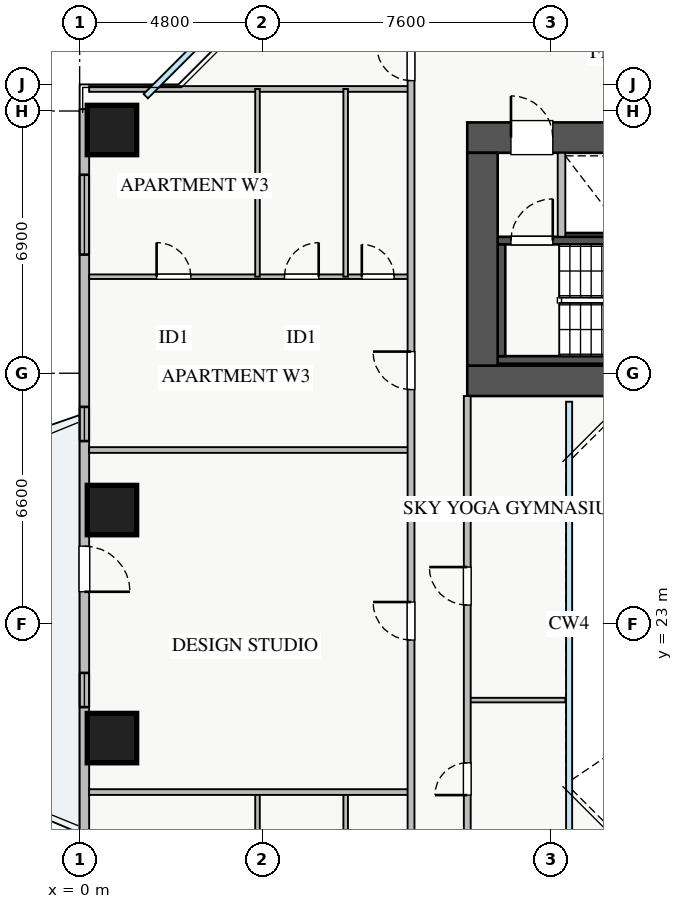
"""IFC4 building model, lengths in metres.
Left out: names, types, materials, properties, quantities, classifications, styles, units other than length and angle.
Written with IfcOpenShell. Run it as: python <this file> out.ifc"""

import sys

from ifc_helpers import new_model, si_unit, direction, frame, frame_2d, origin, origin_2d, place, context, subcontext, project, spatial, rectangle, extrude, source, transform, mapped, element, fill, save


model = new_model("IFC4")
c1 = context("Model", 3, precision=1e-05, world=origin(), true_north=direction((0.0, 1.0)))
c2 = subcontext(c1, "Body", "Model", "MODEL_VIEW")
j1 = project(units=[si_unit("LENGTHUNIT", "METRE"), si_unit("PLANEANGLEUNIT", "RADIAN")], contexts=[c1])
p1 = place(None, origin())
s1 = spatial("IfcSite", under=j1, at=p1, CompositionType="ELEMENT")
p2 = place(p1, origin())
s2 = spatial("IfcBuilding", under=s1, at=p2, CompositionType="ELEMENT")
p3 = place(p2, frame((0.0, 0.0, 86.0)))
s3 = spatial("IfcBuildingStorey", under=s2, at=p3, CompositionType="ELEMENT", Elevation=86.0)
p4 = place(p3, frame((12.68, 33.2, 0.0), z_axis=(0.0, 0.0, 1.0), x_axis=(1.0, 0.0, 0.0)))
e1 = element("IfcWall", 1, at=p4, inside=s3, PredefinedType="SHEAR", context=c2, shape_type="SweptSolid", body=[
    extrude(rectangle(XDim=1.94, YDim=0.18, at=frame_2d((0.97, 0.0))), origin(), (0.0, 0.0, 1.0), 3.07),
])
p5 = place(p3, frame((11.0, 29.95, 0.0), z_axis=(0.0, 0.0, 1.0), x_axis=(1.0, 0.0, 0.0)))
e2 = element("IfcWall", 2, at=p5, inside=s3, PredefinedType="SHEAR", context=c2, shape_type="SweptSolid", body=[
    extrude(rectangle(XDim=7.15, YDim=0.2, at=frame_2d((3.575, 0.0))), origin(), (0.0, 0.0, 1.0), 3.25),
])
p6 = place(p3, frame((11.0, 33.09, 0.0), z_axis=(0.0, 0.0, 1.0), x_axis=(1.0, 0.0, 0.0)))
e3 = element("IfcWall", 3, at=p6, inside=s3, PredefinedType="SHEAR", context=c2, shape_type="SweptSolid", body=[
    extrude(rectangle(XDim=7.15, YDim=0.2, at=frame_2d((3.575, 0.0))), origin(), (0.0, 0.0, 1.0), 3.25),
])
p7 = place(p6, frame((0.35, 0.0, 0.0)))
e4 = element("IfcOpeningElement", 4, at=p7, cuts=e3, PredefinedType="OPENING", context=c2, shape_type="SweptSolid", body=[
    extrude(rectangle(XDim=1.1, YDim=2.05, at=frame_2d((0.55, 1.025))), frame((0.0, 0.11, 0.0), z_axis=(0.0, -1.0, 0.0), x_axis=(1.0, 0.0, 0.0)), (0.0, 0.0, 1.0), 0.22),
])
p8 = place(p3, frame((11.1, 30.05, 0.0), z_axis=(0.0, 0.0, 1.0), x_axis=(0.0, 1.0, 0.0)))
e5 = element("IfcWall", 5, at=p8, inside=s3, PredefinedType="SHEAR", context=c2, shape_type="SweptSolid", body=[
    extrude(rectangle(XDim=2.94, YDim=0.2, at=frame_2d((1.47, 0.0))), origin(), (0.0, 0.0, 1.0), 3.25),
])
p9 = place(p3, frame((10.2, 29.4, 0.0), z_axis=(0.0, 0.0, 1.0), x_axis=(1.0, 0.0, 0.0)))
e6 = element("IfcWall", 6, at=p9, inside=s3, PredefinedType="SHEAR", context=c2, shape_type="SweptSolid", body=[
    extrude(rectangle(XDim=17.6, YDim=0.8, at=frame_2d((8.8, 0.0))), origin(), (0.0, 0.0, 1.0), 3.25),
])
p10 = place(p3, frame((10.2, 35.8, 0.0), z_axis=(0.0, 0.0, 1.0), x_axis=(1.0, 0.0, 0.0)))
e7 = element("IfcWall", 7, at=p10, inside=s3, PredefinedType="SHEAR", context=c2, shape_type="SweptSolid", body=[
    extrude(rectangle(XDim=17.6, YDim=0.8, at=frame_2d((8.8, 0.0))), origin(), (0.0, 0.0, 1.0), 3.25),
])
p11 = place(p10, frame((1.15, 0.0, 0.0)))
e8 = element("IfcOpeningElement", 8, at=p11, cuts=e7, PredefinedType="OPENING", context=c2, shape_type="SweptSolid", body=[
    extrude(rectangle(XDim=1.1, YDim=2.05, at=frame_2d((0.55, 1.025))), frame((0.0, 0.41, 0.0), z_axis=(0.0, -1.0, 0.0), x_axis=(1.0, 0.0, 0.0)), (0.0, 0.0, 1.0), 0.82),
])
p12 = place(p10, frame((8.3, 0.0, 0.0)))
e9 = element("IfcOpeningElement", 9, at=p12, cuts=e7, PredefinedType="OPENING", context=c2, shape_type="SweptSolid", body=[
    extrude(rectangle(XDim=1.1, YDim=2.05, at=frame_2d((0.55, 1.025))), frame((0.0, 0.41, 0.0), z_axis=(0.0, -1.0, 0.0), x_axis=(1.0, 0.0, 0.0)), (0.0, 0.0, 1.0), 0.82),
])
p13 = place(p10, frame((10.05, 0.0, 0.0)))
e10 = element("IfcOpeningElement", 10, at=p13, cuts=e7, PredefinedType="OPENING", context=c2, shape_type="SweptSolid", body=[
    extrude(rectangle(XDim=1.1, YDim=2.05, at=frame_2d((0.55, 1.025))), frame((0.0, 0.41, 0.0), z_axis=(0.0, -1.0, 0.0), x_axis=(1.0, 0.0, 0.0)), (0.0, 0.0, 1.0), 0.82),
])
p14 = place(p10, frame((14.74, 0.0, 0.0)))
e11 = element("IfcOpeningElement", 11, at=p14, cuts=e7, PredefinedType="OPENING", context=c2, shape_type="SweptSolid", body=[
    extrude(rectangle(XDim=1.0, YDim=2.05, at=frame_2d((0.5, 1.025))), frame((0.0, 0.41, 0.0), z_axis=(0.0, -1.0, 0.0), x_axis=(1.0, 0.0, 0.0)), (0.0, 0.0, 1.0), 0.82),
])
p15 = place(p10, frame((12.585, 0.0, 0.0)))
e12 = element("IfcOpeningElement", 12, at=p15, cuts=e7, PredefinedType="OPENING", context=c2, shape_type="SweptSolid", body=[
    extrude(rectangle(XDim=1.0, YDim=2.05, at=frame_2d((0.5, 1.025))), frame((0.0, 0.41, 0.0), z_axis=(0.0, -1.0, 0.0), x_axis=(1.0, 0.0, 0.0)), (0.0, 0.0, 1.0), 0.82),
])
p16 = place(p3, frame((10.6, 29.8, 0.0), z_axis=(0.0, 0.0, 1.0), x_axis=(0.0, 1.0, 0.0)))
e13 = element("IfcWall", 13, at=p16, inside=s3, PredefinedType="SHEAR", context=c2, shape_type="SweptSolid", body=[
    extrude(rectangle(XDim=5.6, YDim=0.8, at=frame_2d((2.8, 0.0))), origin(), (0.0, 0.0, 1.0), 3.25),
])
m1 = source(origin(), c2, "Body", "SweptSolid", [
    extrude(rectangle(XDim=1.3, YDim=1.3, at=origin_2d()), origin(), (0.0, 0.0, 1.0), 3.25),
])
for number, where, z_axis, x_axis in (
    (14, (0.85, 36.0, 0.0), (0.0, 0.0, 1.0), (1.0, 0.0, 0.0)),
    (15, (0.85, 26.0, 0.0), (0.0, 0.0, 1.0), (1.0, 0.0, 0.0)),
    (16, (0.85, 20.0, 0.0), (0.0, 0.0, 1.0), (1.0, 0.0, 0.0)),
):
    element("IfcColumn", number, at=place(p3, frame(where, z_axis=z_axis, x_axis=x_axis)), inside=s3, PredefinedType="COLUMN", context=c2, shape_type="MappedRepresentation", body=[
        mapped(m1, transform((0.0, 0.0, 0.0), x_axis=(1.0, 0.0, 0.0), y_axis=(0.0, 1.0, 0.0), z_axis=(0.0, 0.0, 1.0), scale=1.0)),
    ])
p17 = place(p3, frame((0.125, 9.45, 0.0), z_axis=(0.0, 0.0, 1.0), x_axis=(0.0, 1.0, 0.0)))
e17 = element("IfcWall", 17, at=p17, inside=s3, PredefinedType="STANDARD", context=c2, shape_type="SweptSolid", body=[
    extrude(rectangle(XDim=27.1, YDim=0.25, at=frame_2d((13.55, 0.0))), origin(), (0.0, 0.0, 1.0), 2.61),
])
p18 = place(p17, frame((14.4, 0.0, 0.0)))
e18 = element("IfcOpeningElement", 18, at=p18, cuts=e17, PredefinedType="OPENING", context=c2, shape_type="SweptSolid", body=[
    extrude(rectangle(XDim=1.2, YDim=2.1, at=frame_2d((0.6, 1.05))), frame((0.0, 0.135, 0.0), z_axis=(0.0, -1.0, 0.0), x_axis=(1.0, 0.0, 0.0)), (0.0, 0.0, 1.0), 0.27),
])
p19 = place(p17, frame((1.482, 0.0, 0.9)))
e19 = element("IfcOpeningElement", 19, at=p19, cuts=e17, PredefinedType="OPENING", context=c2, shape_type="SweptSolid", body=[
    extrude(rectangle(XDim=2.1, YDim=1.5, at=frame_2d((1.05, 0.75))), frame((0.0, 0.135, 0.0), z_axis=(0.0, -1.0, 0.0), x_axis=(1.0, 0.0, 0.0)), (0.0, 0.0, 1.0), 0.27),
])
p20 = place(p17, frame((23.272, 0.0, 0.9)))
e20 = element("IfcOpeningElement", 20, at=p20, cuts=e17, PredefinedType="OPENING", context=c2, shape_type="SweptSolid", body=[
    extrude(rectangle(XDim=2.1, YDim=1.5, at=frame_2d((1.05, 0.75))), frame((0.0, 0.135, 0.0), z_axis=(0.0, -1.0, 0.0), x_axis=(1.0, 0.0, 0.0)), (0.0, 0.0, 1.0), 0.27),
])
p21 = place(p17, frame((5.317, 0.0, 0.9)))
e21 = element("IfcOpeningElement", 21, at=p21, cuts=e17, PredefinedType="OPENING", context=c2, shape_type="SweptSolid", body=[
    extrude(rectangle(XDim=2.4, YDim=1.5, at=frame_2d((1.2, 0.75))), frame((0.0, 0.135, 0.0), z_axis=(0.0, -1.0, 0.0), x_axis=(1.0, 0.0, 0.0)), (0.0, 0.0, 1.0), 0.27),
])
p22 = place(p17, frame((11.365, 0.0, 0.9)))
e22 = element("IfcOpeningElement", 22, at=p22, cuts=e17, PredefinedType="OPENING", context=c2, shape_type="SweptSolid", body=[
    extrude(rectangle(XDim=0.9, YDim=1.2, at=frame_2d((0.45, 0.6))), frame((0.0, 0.135, 0.0), z_axis=(0.0, -1.0, 0.0), x_axis=(1.0, 0.0, 0.0)), (0.0, 0.0, 1.0), 0.27),
])
p23 = place(p17, frame((18.365, 0.0, 0.9)))
e23 = element("IfcOpeningElement", 23, at=p23, cuts=e17, PredefinedType="OPENING", context=c2, shape_type="SweptSolid", body=[
    extrude(rectangle(XDim=0.9, YDim=1.2, at=frame_2d((0.45, 0.6))), frame((0.0, 0.135, 0.0), z_axis=(0.0, -1.0, 0.0), x_axis=(1.0, 0.0, 0.0)), (0.0, 0.0, 1.0), 0.27),
])
p24 = place(p3, frame((12.68, 33.19, 0.0), z_axis=(0.0, 0.0, 1.0), x_axis=(0.0, 1.0, 0.0)))
e24 = element("IfcWall", 24, at=p24, inside=s3, PredefinedType="PARTITIONING", context=c2, shape_type="SweptSolid", body=[
    extrude(rectangle(XDim=2.21, YDim=0.2, at=frame_2d((1.105, 0.0))), origin(), (0.0, 0.0, 1.0), 3.07),
])
p25 = place(p3, frame((0.25, 37.08, 0.0), z_axis=(0.0, 0.0, 1.0), x_axis=(1.0, 0.0, 0.0)))
e25 = element("IfcWall", 25, at=p25, inside=s3, PredefinedType="PARTITIONING", context=c2, shape_type="SweptSolid", body=[
    extrude(rectangle(XDim=8.47, YDim=0.15, at=frame_2d((4.235, 0.0))), origin(), (0.0, 0.0, 1.0), 3.07),
])
for number, where, z_axis, x_axis in (
    (26, (4.68, 13.37, 0.0), (0.0, 0.0, 1.0), (0.0, 1.0, 0.0)),
    (27, (7.0, 13.37, 0.0), (0.0, 0.0, 1.0), (0.0, 1.0, 0.0)),
):
    element("IfcWall", number, at=place(p3, frame(where, z_axis=z_axis, x_axis=x_axis)), inside=s3, PredefinedType="PLUMBINGWALL", context=c2, shape_type="SweptSolid", body=[
        extrude(rectangle(XDim=5.21, YDim=0.12, at=frame_2d((2.605, 0.0))), origin(), (0.0, 0.0, 1.0), 3.07),
    ])
p26 = place(p3, frame((0.25, 18.58, 0.0), z_axis=(0.0, 0.0, 1.0), x_axis=(1.0, 0.0, 0.0)))
e28 = element("IfcWall", 28, at=p26, inside=s3, PredefinedType="PARTITIONING", context=c2, shape_type="SweptSolid", body=[
    extrude(rectangle(XDim=8.47, YDim=0.15, at=frame_2d((4.235, 0.0))), origin(), (0.0, 0.0, 1.0), 3.07),
])
p27 = place(p3, frame((0.25, 32.14, 0.0), z_axis=(0.0, 0.0, 1.0), x_axis=(1.0, 0.0, 0.0)))
e29 = element("IfcWall", 29, at=p27, inside=s3, PredefinedType="PLUMBINGWALL", context=c2, shape_type="SweptSolid", body=[
    extrude(rectangle(XDim=8.47, YDim=0.12, at=frame_2d((4.235, 0.0))), origin(), (0.0, 0.0, 1.0), 3.07),
])
p28 = place(p27, frame((1.775, 0.0, 0.0)))
e30 = element("IfcOpeningElement", 30, at=p28, cuts=e29, PredefinedType="OPENING", context=c2, shape_type="SweptSolid", body=[
    extrude(rectangle(XDim=0.9, YDim=2.05, at=frame_2d((0.45, 1.025))), frame((0.0, 0.07, 0.0), z_axis=(0.0, -1.0, 0.0), x_axis=(1.0, 0.0, 0.0)), (0.0, 0.0, 1.0), 0.14),
])
p29 = place(p27, frame((5.14, 0.0, 0.0)))
e31 = element("IfcOpeningElement", 31, at=p29, cuts=e29, PredefinedType="OPENING", context=c2, shape_type="SweptSolid", body=[
    extrude(rectangle(XDim=0.9, YDim=2.05, at=frame_2d((0.45, 1.025))), frame((0.0, 0.07, 0.0), z_axis=(0.0, -1.0, 0.0), x_axis=(1.0, 0.0, 0.0)), (0.0, 0.0, 1.0), 0.14),
])
p30 = place(p27, frame((7.175, 0.0, 0.0)))
e32 = element("IfcOpeningElement", 32, at=p30, cuts=e29, PredefinedType="OPENING", context=c2, shape_type="SweptSolid", body=[
    extrude(rectangle(XDim=0.85, YDim=2.05, at=frame_2d((0.425, 1.025))), frame((0.0, 0.07, 0.0), z_axis=(0.0, -1.0, 0.0), x_axis=(1.0, 0.0, 0.0)), (0.0, 0.0, 1.0), 0.14),
])
for number, where, z_axis, x_axis in (
    (33, (4.68, 32.14, 0.0), (0.0, 0.0, 1.0), (0.0, 1.0, 0.0)),
    (34, (7.0, 32.14, 0.0), (0.0, 0.0, 1.0), (0.0, 1.0, 0.0)),
):
    element("IfcWall", number, at=place(p3, frame(where, z_axis=z_axis, x_axis=x_axis)), inside=s3, PredefinedType="PLUMBINGWALL", context=c2, shape_type="SweptSolid", body=[
        extrude(rectangle(XDim=4.94, YDim=0.12, at=frame_2d((2.47, 0.0))), origin(), (0.0, 0.0, 1.0), 3.07),
    ])
p31 = place(p3, frame((0.25, 27.58, 0.0), z_axis=(0.0, 0.0, 1.0), x_axis=(1.0, 0.0, 0.0)))
e35 = element("IfcWall", 35, at=p31, inside=s3, PredefinedType="PARTITIONING", context=c2, shape_type="SweptSolid", body=[
    extrude(rectangle(XDim=8.47, YDim=0.15, at=frame_2d((4.235, 0.0))), origin(), (0.0, 0.0, 1.0), 3.07),
])
p32 = place(p3, frame((8.72, 7.21, 0.0), z_axis=(0.0, 0.0, 1.0), x_axis=(0.0, 1.0, 0.0)))
e36 = element("IfcWall", 36, at=p32, inside=s3, PredefinedType="PARTITIONING", context=c2, shape_type="SweptSolid", body=[
    extrude(rectangle(XDim=31.23, YDim=0.18, at=frame_2d((15.615, 0.0))), origin(), (0.0, 0.0, 1.0), 3.07),
])
p33 = place(p32, frame((30.09, 0.0, 0.0)))
e37 = element("IfcOpeningElement", 37, at=p33, cuts=e36, PredefinedType="OPENING", context=c2, shape_type="SweptSolid", body=[
    extrude(rectangle(XDim=0.9, YDim=2.05, at=frame_2d((0.45, 1.025))), frame((0.0, 0.1, 0.0), z_axis=(0.0, -1.0, 0.0), x_axis=(1.0, 0.0, 0.0)), (0.0, 0.0, 1.0), 0.2),
])
p34 = place(p32, frame((0.24, 0.0, 0.0)))
e38 = element("IfcOpeningElement", 38, at=p34, cuts=e36, PredefinedType="OPENING", context=c2, shape_type="SweptSolid", body=[
    extrude(rectangle(XDim=0.9, YDim=2.05, at=frame_2d((0.45, 1.025))), frame((0.0, 0.1, 0.0), z_axis=(0.0, -1.0, 0.0), x_axis=(1.0, 0.0, 0.0)), (0.0, 0.0, 1.0), 0.2),
])
p35 = place(p32, frame((3.07, 0.0, 0.0)))
e39 = element("IfcOpeningElement", 39, at=p35, cuts=e36, PredefinedType="OPENING", context=c2, shape_type="SweptSolid", body=[
    extrude(rectangle(XDim=1.0, YDim=2.05, at=frame_2d((0.5, 1.025))), frame((0.0, 0.1, 0.0), z_axis=(0.0, -1.0, 0.0), x_axis=(1.0, 0.0, 0.0)), (0.0, 0.0, 1.0), 0.2),
])
p36 = place(p32, frame((15.37, 0.0, 0.0)))
e40 = element("IfcOpeningElement", 40, at=p36, cuts=e36, PredefinedType="OPENING", context=c2, shape_type="SweptSolid", body=[
    extrude(rectangle(XDim=1.0, YDim=2.05, at=frame_2d((0.5, 1.025))), frame((0.0, 0.1, 0.0), z_axis=(0.0, -1.0, 0.0), x_axis=(1.0, 0.0, 0.0)), (0.0, 0.0, 1.0), 0.2),
])
p37 = place(p32, frame((21.96, 0.0, 0.0)))
e41 = element("IfcOpeningElement", 41, at=p37, cuts=e36, PredefinedType="OPENING", context=c2, shape_type="SweptSolid", body=[
    extrude(rectangle(XDim=1.0, YDim=2.05, at=frame_2d((0.5, 1.025))), frame((0.0, 0.1, 0.0), z_axis=(0.0, -1.0, 0.0), x_axis=(1.0, 0.0, 0.0)), (0.0, 0.0, 1.0), 0.2),
])
p38 = place(p3, frame((10.2, 21.0, 0.0), z_axis=(0.0, 0.0, 1.0), x_axis=(1.0, 0.0, 0.0)))
e42 = element("IfcWall", 42, at=p38, inside=s3, PredefinedType="PLUMBINGWALL", context=c2, shape_type="SweptSolid", body=[
    extrude(rectangle(XDim=2.58, YDim=0.12, at=frame_2d((1.29, 0.0))), origin(), (0.0, 0.0, 1.0), 3.07),
])
p39 = place(p3, frame((10.2, 17.0, 0.0), z_axis=(0.0, 0.0, 1.0), x_axis=(0.0, 1.0, 0.0)))
e43 = element("IfcWall", 43, at=p39, inside=s3, PredefinedType="PARTITIONING", context=c2, shape_type="SweptSolid", body=[
    extrude(rectangle(XDim=12.0, YDim=0.18, at=frame_2d((6.0, 0.0))), origin(), (0.0, 0.0, 1.0), 3.07),
])
p40 = place(p39, frame((1.5, 0.0, 0.0)))
e44 = element("IfcOpeningElement", 44, at=p40, cuts=e43, PredefinedType="OPENING", context=c2, shape_type="SweptSolid", body=[
    extrude(rectangle(XDim=0.85, YDim=2.05, at=frame_2d((0.425, 1.025))), frame((0.0, 0.1, 0.0), z_axis=(0.0, -1.0, 0.0), x_axis=(1.0, 0.0, 0.0)), (0.0, 0.0, 1.0), 0.2),
])
p41 = place(p39, frame((6.5, 0.0, 0.0)))
e45 = element("IfcOpeningElement", 45, at=p41, cuts=e43, PredefinedType="OPENING", context=c2, shape_type="SweptSolid", body=[
    extrude(rectangle(XDim=1.0, YDim=2.05, at=frame_2d((0.5, 1.025))), frame((0.0, 0.1, 0.0), z_axis=(0.0, -1.0, 0.0), x_axis=(1.0, 0.0, 0.0)), (0.0, 0.0, 1.0), 0.2),
])
m2 = source(origin(), c2, "Body", "SweptSolid", [
    extrude(rectangle(XDim=1.2, YDim=2.1, at=frame_2d((0.6, 1.05))), frame((0.0, 0.025, 0.0), z_axis=(0.0, -1.0, 0.0), x_axis=(1.0, 0.0, 0.0)), (0.0, 0.0, 1.0), 0.05),
])
p42 = place(p18, frame((1.2, 0.0, 0.0), z_axis=(0.0, 0.0, 1.0), x_axis=(-1.0, 0.0, 0.0)))
e46 = element("IfcDoor", 46, at=p42, inside=s3, OperationType="SINGLE_SWING_LEFT", PredefinedType="DOOR", context=c2, shape_type="MappedRepresentation", body=[
    mapped(m2, transform((0.0, 0.0, 0.0), x_axis=(1.0, 0.0, 0.0), y_axis=(0.0, 1.0, 0.0), z_axis=(0.0, 0.0, 1.0), scale=1.0)),
])
fill(e18, e46)
m3 = source(origin(), c2, "Body", "SweptSolid", [
    extrude(rectangle(XDim=2.1, YDim=1.5, at=frame_2d((1.05, 0.75))), frame((0.0, 0.03, 0.0), z_axis=(0.0, -1.0, 0.0), x_axis=(1.0, 0.0, 0.0)), (0.0, 0.0, 1.0), 0.06),
])
p43 = place(p20, origin())
e47 = element("IfcWindow", 47, at=p43, inside=s3, PartitioningType="TRIPLE_PANEL_VERTICAL", PredefinedType="WINDOW", context=c2, shape_type="MappedRepresentation", body=[
    mapped(m3, transform((0.0, 0.0, 0.0), x_axis=(1.0, 0.0, 0.0), y_axis=(0.0, 1.0, 0.0), z_axis=(0.0, 0.0, 1.0), scale=1.0)),
])
fill(e20, e47)
m4 = source(origin(), c2, "Body", "SweptSolid", [
    extrude(rectangle(XDim=1.1, YDim=2.05, at=frame_2d((0.55, 1.025))), frame((0.0, 0.025, 0.0), z_axis=(0.0, -1.0, 0.0), x_axis=(1.0, 0.0, 0.0)), (0.0, 0.0, 1.0), 0.05),
])
p44 = place(p11, origin())
e48 = element("IfcDoor", 48, at=p44, inside=s3, OperationType="SINGLE_SWING_LEFT", PredefinedType="DOOR", context=c2, shape_type="MappedRepresentation", body=[
    mapped(m4, transform((0.0, 0.0, 0.0), x_axis=(1.0, 0.0, 0.0), y_axis=(0.0, 1.0, 0.0), z_axis=(0.0, 0.0, 1.0), scale=1.0)),
])
fill(e8, e48)
p45 = place(p7, origin())
e49 = element("IfcDoor", 49, at=p45, inside=s3, OperationType="SINGLE_SWING_RIGHT", PredefinedType="DOOR", context=c2, shape_type="MappedRepresentation", body=[
    mapped(m4, transform((0.0, 0.0, 0.0), x_axis=(1.0, 0.0, 0.0), y_axis=(0.0, 1.0, 0.0), z_axis=(0.0, 0.0, 1.0), scale=1.0)),
])
fill(e4, e49)
m5 = source(origin(), c2, "Body", "SweptSolid", [
    extrude(rectangle(XDim=0.9, YDim=2.05, at=frame_2d((0.45, 1.025))), frame((0.0, 0.025, 0.0), z_axis=(0.0, -1.0, 0.0), x_axis=(1.0, 0.0, 0.0)), (0.0, 0.0, 1.0), 0.05),
])
p46 = place(p28, origin())
e50 = element("IfcDoor", 50, at=p46, inside=s3, OperationType="SINGLE_SWING_LEFT", PredefinedType="DOOR", context=c2, shape_type="MappedRepresentation", body=[
    mapped(m5, transform((0.0, 0.0, 0.0), x_axis=(1.0, 0.0, 0.0), y_axis=(0.0, 1.0, 0.0), z_axis=(0.0, 0.0, 1.0), scale=1.0)),
])
fill(e30, e50)
p47 = place(p29, origin())
e51 = element("IfcDoor", 51, at=p47, inside=s3, OperationType="SINGLE_SWING_RIGHT", PredefinedType="DOOR", context=c2, shape_type="MappedRepresentation", body=[
    mapped(m5, transform((0.0, 0.0, 0.0), x_axis=(1.0, 0.0, 0.0), y_axis=(0.0, 1.0, 0.0), z_axis=(0.0, 0.0, 1.0), scale=1.0)),
])
fill(e31, e51)
m6 = source(origin(), c2, "Body", "SweptSolid", [
    extrude(rectangle(XDim=0.85, YDim=2.05, at=frame_2d((0.425, 1.025))), frame((0.0, 0.025, 0.0), z_axis=(0.0, -1.0, 0.0), x_axis=(1.0, 0.0, 0.0)), (0.0, 0.0, 1.0), 0.05),
])
p48 = place(p30, origin())
e52 = element("IfcDoor", 52, at=p48, inside=s3, OperationType="SINGLE_SWING_LEFT", PredefinedType="DOOR", context=c2, shape_type="MappedRepresentation", body=[
    mapped(m6, transform((0.0, 0.0, 0.0), x_axis=(1.0, 0.0, 0.0), y_axis=(0.0, 1.0, 0.0), z_axis=(0.0, 0.0, 1.0), scale=1.0)),
])
fill(e32, e52)
p49 = place(p33, origin())
e53 = element("IfcDoor", 53, at=p49, inside=s3, OperationType="SINGLE_SWING_RIGHT", PredefinedType="DOOR", context=c2, shape_type="MappedRepresentation", body=[
    mapped(m5, transform((0.0, 0.0, 0.0), x_axis=(1.0, 0.0, 0.0), y_axis=(0.0, 1.0, 0.0), z_axis=(0.0, 0.0, 1.0), scale=1.0)),
])
fill(e37, e53)
m7 = source(origin(), c2, "Body", "SweptSolid", [
    extrude(rectangle(XDim=1.0, YDim=2.05, at=frame_2d((0.5, 1.025))), frame((0.0, 0.025, 0.0), z_axis=(0.0, -1.0, 0.0), x_axis=(1.0, 0.0, 0.0)), (0.0, 0.0, 1.0), 0.05),
])
p50 = place(p36, origin())
e54 = element("IfcDoor", 54, at=p50, inside=s3, OperationType="SINGLE_SWING_RIGHT", PredefinedType="DOOR", context=c2, shape_type="MappedRepresentation", body=[
    mapped(m7, transform((0.0, 0.0, 0.0), x_axis=(1.0, 0.0, 0.0), y_axis=(0.0, 1.0, 0.0), z_axis=(0.0, 0.0, 1.0), scale=1.0)),
])
fill(e40, e54)
p51 = place(p37, origin())
e55 = element("IfcDoor", 55, at=p51, inside=s3, OperationType="SINGLE_SWING_RIGHT", PredefinedType="DOOR", context=c2, shape_type="MappedRepresentation", body=[
    mapped(m7, transform((0.0, 0.0, 0.0), x_axis=(1.0, 0.0, 0.0), y_axis=(0.0, 1.0, 0.0), z_axis=(0.0, 0.0, 1.0), scale=1.0)),
])
fill(e41, e55)
p52 = place(p40, origin())
e56 = element("IfcDoor", 56, at=p52, inside=s3, OperationType="SINGLE_SWING_LEFT", PredefinedType="DOOR", context=c2, shape_type="MappedRepresentation", body=[
    mapped(m6, transform((0.0, 0.0, 0.0), x_axis=(1.0, 0.0, 0.0), y_axis=(0.0, 1.0, 0.0), z_axis=(0.0, 0.0, 1.0), scale=1.0)),
])
fill(e44, e56)
p53 = place(p41, origin())
e57 = element("IfcDoor", 57, at=p53, inside=s3, OperationType="SINGLE_SWING_RIGHT", PredefinedType="DOOR", context=c2, shape_type="MappedRepresentation", body=[
    mapped(m7, transform((0.0, 0.0, 0.0), x_axis=(1.0, 0.0, 0.0), y_axis=(0.0, 1.0, 0.0), z_axis=(0.0, 0.0, 1.0), scale=1.0)),
])
fill(e45, e57)
m8 = source(origin(), c2, "Body", "SweptSolid", [
    extrude(rectangle(XDim=0.9, YDim=1.2, at=frame_2d((0.45, 0.6))), frame((0.0, 0.03, 0.0), z_axis=(0.0, -1.0, 0.0), x_axis=(1.0, 0.0, 0.0)), (0.0, 0.0, 1.0), 0.06),
])
p54 = place(p22, origin())
e58 = element("IfcWindow", 58, at=p54, inside=s3, PartitioningType="SINGLE_PANEL", PredefinedType="WINDOW", context=c2, shape_type="MappedRepresentation", body=[
    mapped(m8, transform((0.0, 0.0, 0.0), x_axis=(1.0, 0.0, 0.0), y_axis=(0.0, 1.0, 0.0), z_axis=(0.0, 0.0, 1.0), scale=1.0)),
])
fill(e22, e58)
p55 = place(p23, origin())
e59 = element("IfcWindow", 59, at=p55, inside=s3, PartitioningType="SINGLE_PANEL", PredefinedType="WINDOW", context=c2, shape_type="MappedRepresentation", body=[
    mapped(m8, transform((0.0, 0.0, 0.0), x_axis=(1.0, 0.0, 0.0), y_axis=(0.0, 1.0, 0.0), z_axis=(0.0, 0.0, 1.0), scale=1.0)),
])
fill(e23, e59)
save(model, sys.argv[1])
